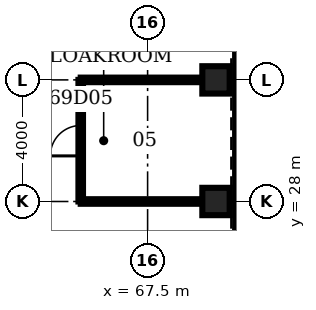
"""IFC4 building model, lengths in metres.
Left out: names, types, materials, properties, quantities, classifications, styles, units other than length and angle.
Written with IfcOpenShell. Run it as: python <this file> out.ifc"""

import sys

from ifc_helpers import new_model, si_unit, direction, frame, frame_2d, origin, origin_2d, place, context, subcontext, project, spatial, rectangle, hollow_rectangle, extrude, element, fill, save


model = new_model("IFC4")
c1 = context("Model", 3, precision=1e-05, world=origin(), true_north=direction((0.0, 1.0)))
c2 = subcontext(c1, "Body", "Model", "MODEL_VIEW")
j1 = project(units=[si_unit("LENGTHUNIT", "METRE"), si_unit("PLANEANGLEUNIT", "RADIAN")], contexts=[c1])
p1 = place(None, origin())
s1 = spatial("IfcSite", under=j1, at=p1, CompositionType="ELEMENT")
p2 = place(p1, origin())
s2 = spatial("IfcBuilding", under=s1, at=p2, CompositionType="ELEMENT")
p3 = place(p2, frame((0.0, 0.0, 304.7)))
s3 = spatial("IfcBuildingStorey", under=s2, at=p3, CompositionType="ELEMENT", Elevation=304.7)
for number, where, z_axis, x_axis in (
    (1, (69.75, 28.0, 0.0), (0.0, 0.0, 1.0), (1.0, 0.0, 0.0)),
    (2, (69.75, 32.0, 0.0), (0.0, 0.0, 1.0), (1.0, 0.0, 0.0)),
):
    element("IfcColumn", number, at=place(p3, frame(where, z_axis=z_axis, x_axis=x_axis)), inside=s3, PredefinedType="COLUMN", context=c2, shape_type="SweptSolid", body=[
        extrude(hollow_rectangle(XDim=0.9, YDim=0.9, WallThickness=0.06, at=origin_2d()), origin(), (0.0, 0.0, 1.0), 4.2),
    ])
for number, where, z_axis, x_axis in (
    (3, (65.3, 28.0, 0.0), (0.0, 0.0, 1.0), (1.0, 0.0, 0.0)),
    (4, (65.3, 32.0, 0.0), (0.0, 0.0, 1.0), (1.0, 0.0, 0.0)),
):
    element("IfcWall", number, at=place(p3, frame(where, z_axis=z_axis, x_axis=x_axis)), inside=s3, PredefinedType="PARTITIONING", context=c2, shape_type="SweptSolid", body=[
        extrude(rectangle(XDim=4.0, YDim=0.15, at=frame_2d((2.0, 0.0))), origin(), (0.0, 0.0, 1.0), 3.0),
    ])
p4 = place(p3, frame((65.3, 28.0, 0.0), z_axis=(0.0, 0.0, 1.0), x_axis=(0.0, 1.0, 0.0)))
e5 = element("IfcWall", 5, at=p4, inside=s3, PredefinedType="PARTITIONING", context=c2, shape_type="SweptSolid", body=[
    extrude(rectangle(XDim=4.0, YDim=0.15, at=frame_2d((2.0, 0.0))), origin(), (0.0, 0.0, 1.0), 3.0),
])
p5 = place(p4, frame((1.5, 0.0, 0.0)))
e6 = element("IfcOpeningElement", 6, at=p5, cuts=e5, PredefinedType="OPENING", context=c2, shape_type="SweptSolid", body=[
    extrude(rectangle(XDim=1.0, YDim=2.1, at=frame_2d((0.5, 1.05))), frame((0.0, 0.085, 0.0), z_axis=(0.0, -1.0, 0.0), x_axis=(1.0, 0.0, 0.0)), (0.0, 0.0, 1.0), 0.17),
])
p6 = place(p5, origin())
e7 = element("IfcDoor", 7, at=p6, inside=s3, OperationType="SINGLE_SWING_LEFT", PredefinedType="DOOR", context=c2, shape_type="SweptSolid", body=[
    extrude(rectangle(XDim=1.0, YDim=2.1, at=frame_2d((0.5, 1.05))), frame((0.0, 0.025, 0.0), z_axis=(0.0, -1.0, 0.0), x_axis=(1.0, 0.0, 0.0)), (0.0, 0.0, 1.0), 0.05),
])
fill(e6, e7)
save(model, sys.argv[1])
